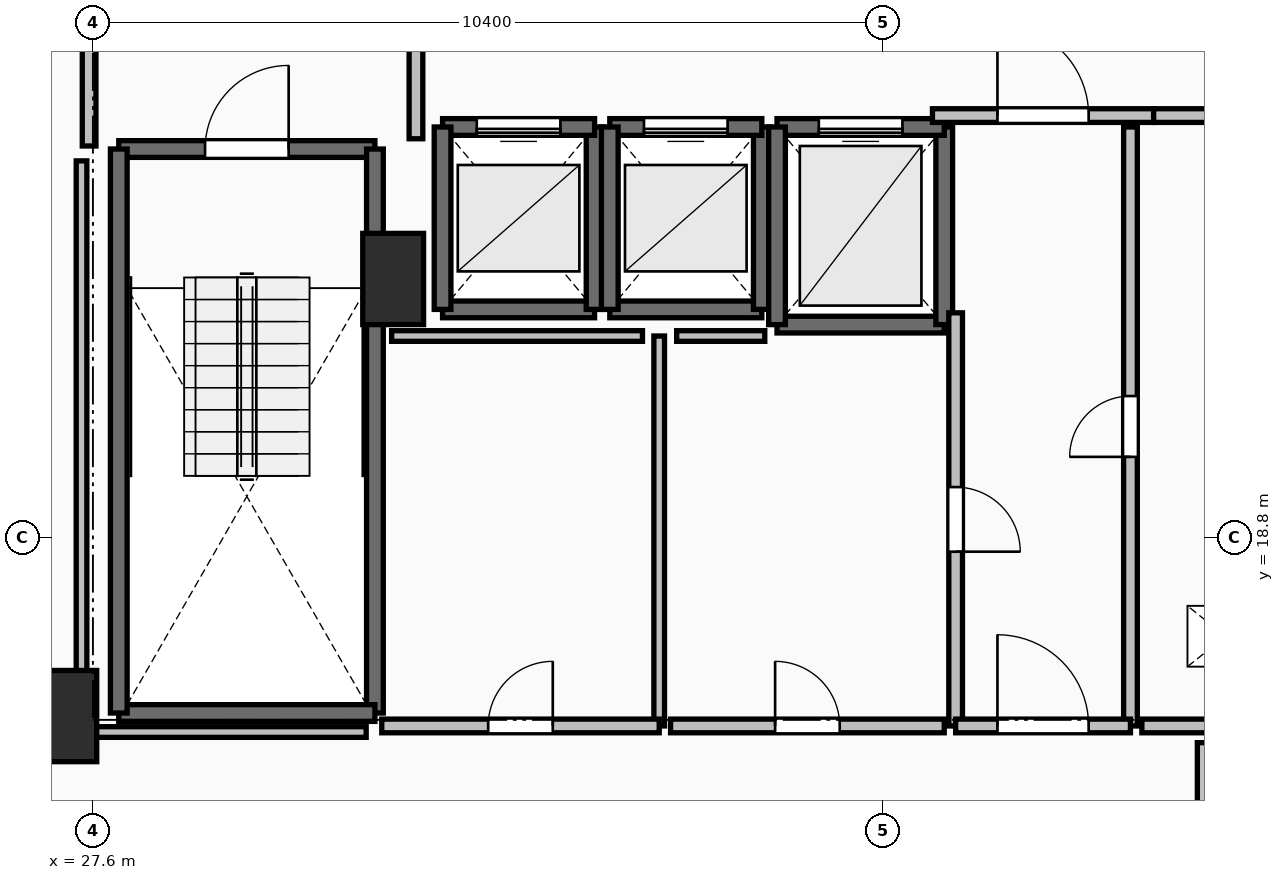
"""IFC4 building model, lengths in metres.
Left out: names, types, materials, properties, quantities, classifications, styles, units other than length and angle.
Written with IfcOpenShell. Run it as: python <this file> out.ifc"""

import sys

from ifc_helpers import new_model, si_unit, direction, frame, frame_2d, origin, origin_2d, place, context, subcontext, project, spatial, rectangle, extrude, element, fill, save


model = new_model("IFC4")
c1 = context("Model", 3, precision=1e-05, world=origin(), true_north=direction((0.0, 1.0)))
c2 = subcontext(c1, "Body", "Model", "MODEL_VIEW")
j1 = project(units=[si_unit("LENGTHUNIT", "METRE"), si_unit("PLANEANGLEUNIT", "RADIAN")], contexts=[c1])
p1 = place(None, origin())
s1 = spatial("IfcSite", under=j1, at=p1, CompositionType="ELEMENT")
p2 = place(p1, origin())
s2 = spatial("IfcBuilding", under=s1, at=p2, CompositionType="ELEMENT")
p3 = place(p2, frame((0.0, 0.0, 171.1)))
s3 = spatial("IfcBuildingStorey", under=s2, at=p3, CompositionType="ELEMENT", Elevation=171.1)
for number, where, z_axis, x_axis in (
    (1, (27.25, 16.45, 0.0), (0.0, 0.0, 1.0), (1.0, 0.0, 0.0)),
    (2, (31.55, 22.2, 0.0), (0.0, 0.0, 1.0), (1.0, 0.0, 0.0)),
):
    element("IfcColumn", number, at=place(p3, frame(where, z_axis=z_axis, x_axis=x_axis)), inside=s3, PredefinedType="PILASTER", context=c2, shape_type="SweptSolid", body=[
        extrude(rectangle(XDim=0.8, YDim=1.2, at=origin_2d()), origin(), (0.0, 0.0, 1.0), 3.5),
    ])
p4 = place(p3, frame((27.94, 23.91, 0.0), z_axis=(0.0, 0.0, 1.0), x_axis=(1.0, 0.0, 0.0)))
e3 = element("IfcWall", 3, at=p4, inside=s3, PredefinedType="SOLIDWALL", context=c2, shape_type="SweptSolid", body=[
    extrude(rectangle(XDim=3.37, YDim=0.22, at=frame_2d((1.685, 0.0))), origin(), (0.0, 0.0, 1.0), 3.2),
])
p5 = place(p4, frame((1.135, 0.0, 0.0)))
e4 = element("IfcOpeningElement", 4, at=p5, cuts=e3, PredefinedType="OPENING", context=c2, shape_type="SweptSolid", body=[
    extrude(rectangle(XDim=1.1, YDim=2.15, at=frame_2d((0.55, 1.075))), frame((0.0, 0.125, 0.0), z_axis=(0.0, -1.0, 0.0), x_axis=(1.0, 0.0, 0.0)), (0.0, 0.0, 1.0), 0.25),
])
p6 = place(p3, frame((31.31, 23.91, 0.0), z_axis=(0.0, 0.0, 1.0), x_axis=(0.0, -1.0, 0.0)))
e5 = element("IfcWall", 5, at=p6, inside=s3, PredefinedType="SOLIDWALL", context=c2, shape_type="SweptSolid", body=[
    extrude(rectangle(XDim=7.42, YDim=0.22, at=frame_2d((3.71, 0.0))), origin(), (0.0, 0.0, 1.0), 3.2),
])
p7 = place(p3, frame((31.31, 16.49, 0.0), z_axis=(0.0, 0.0, 1.0), x_axis=(-1.0, 0.0, 0.0)))
e6 = element("IfcWall", 6, at=p7, inside=s3, PredefinedType="SOLIDWALL", context=c2, shape_type="SweptSolid", body=[
    extrude(rectangle(XDim=3.37, YDim=0.22, at=frame_2d((1.685, 0.0))), origin(), (0.0, 0.0, 1.0), 3.2),
])
p8 = place(p3, frame((27.94, 16.49, 0.0), z_axis=(0.0, 0.0, 1.0), x_axis=(0.0, 1.0, 0.0)))
e7 = element("IfcWall", 7, at=p8, inside=s3, PredefinedType="SOLIDWALL", context=c2, shape_type="SweptSolid", body=[
    extrude(rectangle(XDim=7.42, YDim=0.22, at=frame_2d((3.71, 0.0))), origin(), (0.0, 0.0, 1.0), 3.2),
])
p9 = place(p3, frame((32.2, 21.8, 0.0), z_axis=(0.0, 0.0, 1.0), x_axis=(1.0, 0.0, 0.0)))
e8 = element("IfcWall", 8, at=p9, inside=s3, PredefinedType="SOLIDWALL", context=c2, shape_type="SweptSolid", body=[
    extrude(rectangle(XDim=2.0, YDim=0.22, at=frame_2d((1.0, 0.0))), origin(), (0.0, 0.0, 1.0), 3.2),
])
p10 = place(p3, frame((34.2, 21.8, 0.0), z_axis=(0.0, 0.0, 1.0), x_axis=(0.0, 1.0, 0.0)))
e9 = element("IfcWall", 9, at=p10, inside=s3, PredefinedType="SOLIDWALL", context=c2, shape_type="SweptSolid", body=[
    extrude(rectangle(XDim=2.4, YDim=0.22, at=frame_2d((1.2, 0.0))), origin(), (0.0, 0.0, 1.0), 3.2),
])
p11 = place(p3, frame((34.2, 24.2, 0.0), z_axis=(0.0, 0.0, 1.0), x_axis=(-1.0, 0.0, 0.0)))
e10 = element("IfcWall", 10, at=p11, inside=s3, PredefinedType="SOLIDWALL", context=c2, shape_type="SweptSolid", body=[
    extrude(rectangle(XDim=2.0, YDim=0.22, at=frame_2d((1.0, 0.0))), origin(), (0.0, 0.0, 1.0), 3.2),
])
p12 = place(p11, frame((0.45, 0.0, 0.0)))
e11 = element("IfcOpeningElement", 11, at=p12, cuts=e10, PredefinedType="OPENING", context=c2, shape_type="SweptSolid", body=[
    extrude(rectangle(XDim=1.1, YDim=2.2, at=frame_2d((0.55, 1.1))), frame((0.0, 0.125, 0.0), z_axis=(0.0, -1.0, 0.0), x_axis=(1.0, 0.0, 0.0)), (0.0, 0.0, 1.0), 0.25),
])
p13 = place(p3, frame((32.2, 24.2, 0.0), z_axis=(0.0, 0.0, 1.0), x_axis=(0.0, -1.0, 0.0)))
e12 = element("IfcWall", 12, at=p13, inside=s3, PredefinedType="SOLIDWALL", context=c2, shape_type="SweptSolid", body=[
    extrude(rectangle(XDim=2.4, YDim=0.22, at=frame_2d((1.2, 0.0))), origin(), (0.0, 0.0, 1.0), 3.2),
])
p14 = place(p3, frame((34.4, 21.8, 0.0), z_axis=(0.0, 0.0, 1.0), x_axis=(1.0, 0.0, 0.0)))
e13 = element("IfcWall", 13, at=p14, inside=s3, PredefinedType="SOLIDWALL", context=c2, shape_type="SweptSolid", body=[
    extrude(rectangle(XDim=2.0, YDim=0.22, at=frame_2d((1.0, 0.0))), origin(), (0.0, 0.0, 1.0), 3.2),
])
p15 = place(p3, frame((36.4, 21.8, 0.0), z_axis=(0.0, 0.0, 1.0), x_axis=(0.0, 1.0, 0.0)))
e14 = element("IfcWall", 14, at=p15, inside=s3, PredefinedType="SOLIDWALL", context=c2, shape_type="SweptSolid", body=[
    extrude(rectangle(XDim=2.4, YDim=0.22, at=frame_2d((1.2, 0.0))), origin(), (0.0, 0.0, 1.0), 3.2),
])
p16 = place(p3, frame((36.4, 24.2, 0.0), z_axis=(0.0, 0.0, 1.0), x_axis=(-1.0, 0.0, 0.0)))
e15 = element("IfcWall", 15, at=p16, inside=s3, PredefinedType="SOLIDWALL", context=c2, shape_type="SweptSolid", body=[
    extrude(rectangle(XDim=2.0, YDim=0.22, at=frame_2d((1.0, 0.0))), origin(), (0.0, 0.0, 1.0), 3.2),
])
p17 = place(p16, frame((0.45, 0.0, 0.0)))
e16 = element("IfcOpeningElement", 16, at=p17, cuts=e15, PredefinedType="OPENING", context=c2, shape_type="SweptSolid", body=[
    extrude(rectangle(XDim=1.1, YDim=2.2, at=frame_2d((0.55, 1.1))), frame((0.0, 0.125, 0.0), z_axis=(0.0, -1.0, 0.0), x_axis=(1.0, 0.0, 0.0)), (0.0, 0.0, 1.0), 0.25),
])
p18 = place(p3, frame((34.4, 24.2, 0.0), z_axis=(0.0, 0.0, 1.0), x_axis=(0.0, -1.0, 0.0)))
e17 = element("IfcWall", 17, at=p18, inside=s3, PredefinedType="SOLIDWALL", context=c2, shape_type="SweptSolid", body=[
    extrude(rectangle(XDim=2.4, YDim=0.22, at=frame_2d((1.2, 0.0))), origin(), (0.0, 0.0, 1.0), 3.2),
])
p19 = place(p3, frame((36.6, 21.6, 0.0), z_axis=(0.0, 0.0, 1.0), x_axis=(1.0, 0.0, 0.0)))
e18 = element("IfcWall", 18, at=p19, inside=s3, PredefinedType="SOLIDWALL", context=c2, shape_type="SweptSolid", body=[
    extrude(rectangle(XDim=2.2, YDim=0.22, at=frame_2d((1.1, 0.0))), origin(), (0.0, 0.0, 1.0), 3.2),
])
p20 = place(p3, frame((38.8, 21.6, 0.0), z_axis=(0.0, 0.0, 1.0), x_axis=(0.0, 1.0, 0.0)))
e19 = element("IfcWall", 19, at=p20, inside=s3, PredefinedType="SOLIDWALL", context=c2, shape_type="SweptSolid", body=[
    extrude(rectangle(XDim=2.6, YDim=0.22, at=frame_2d((1.3, 0.0))), origin(), (0.0, 0.0, 1.0), 3.2),
])
p21 = place(p3, frame((38.8, 24.2, 0.0), z_axis=(0.0, 0.0, 1.0), x_axis=(-1.0, 0.0, 0.0)))
e20 = element("IfcWall", 20, at=p21, inside=s3, PredefinedType="SOLIDWALL", context=c2, shape_type="SweptSolid", body=[
    extrude(rectangle(XDim=2.2, YDim=0.22, at=frame_2d((1.1, 0.0))), origin(), (0.0, 0.0, 1.0), 3.2),
])
p22 = place(p21, frame((0.55, 0.0, 0.0)))
e21 = element("IfcOpeningElement", 21, at=p22, cuts=e20, PredefinedType="OPENING", context=c2, shape_type="SweptSolid", body=[
    extrude(rectangle(XDim=1.1, YDim=2.2, at=frame_2d((0.55, 1.1))), frame((0.0, 0.125, 0.0), z_axis=(0.0, -1.0, 0.0), x_axis=(1.0, 0.0, 0.0)), (0.0, 0.0, 1.0), 0.25),
])
p23 = place(p3, frame((36.6, 24.2, 0.0), z_axis=(0.0, 0.0, 1.0), x_axis=(0.0, -1.0, 0.0)))
e22 = element("IfcWall", 22, at=p23, inside=s3, PredefinedType="SOLIDWALL", context=c2, shape_type="SweptSolid", body=[
    extrude(rectangle(XDim=2.6, YDim=0.22, at=frame_2d((1.3, 0.0))), origin(), (0.0, 0.0, 1.0), 3.2),
])
p24 = place(p3, frame((31.85, 24.045, 0.0), z_axis=(0.0, 0.0, 1.0), x_axis=(0.0, 1.0, 0.0)))
e23 = element("IfcWall", 23, at=p24, inside=s3, PredefinedType="PARTITIONING", context=c2, shape_type="SweptSolid", body=[
    extrude(rectangle(XDim=3.91, YDim=0.18, at=frame_2d((1.955, 0.0))), origin(), (0.0, 0.0, 1.0), 3.2),
])
p25 = place(p24, frame((1.355, 0.0, 0.0)))
e24 = element("IfcOpeningElement", 24, at=p25, cuts=e23, PredefinedType="OPENING", context=c2, shape_type="SweptSolid", body=[
    extrude(rectangle(XDim=1.2, YDim=2.15, at=frame_2d((0.6, 1.075))), frame((0.0, 0.105, 0.0), z_axis=(0.0, -1.0, 0.0), x_axis=(1.0, 0.0, 0.0)), (0.0, 0.0, 1.0), 0.21),
])
p26 = place(p3, frame((27.55, 28.0, 0.0), z_axis=(0.0, 0.0, 1.0), x_axis=(0.0, -1.0, 0.0)))
e25 = element("IfcWall", 25, at=p26, inside=s3, PredefinedType="PARTITIONING", context=c2, shape_type="SweptSolid", body=[
    extrude(rectangle(XDim=4.05, YDim=0.18, at=frame_2d((2.025, 0.0))), origin(), (0.0, 0.0, 1.0), 3.2),
])
p27 = place(p26, frame((1.425, 0.0, 0.0)))
e26 = element("IfcOpeningElement", 26, at=p27, cuts=e25, PredefinedType="OPENING", context=c2, shape_type="SweptSolid", body=[
    extrude(rectangle(XDim=1.2, YDim=2.15, at=frame_2d((0.6, 1.075))), frame((0.0, 0.105, 0.0), z_axis=(0.0, -1.0, 0.0), x_axis=(1.0, 0.0, 0.0)), (0.0, 0.0, 1.0), 0.21),
])
p28 = place(p3, frame((38.645, 24.35, 0.0), z_axis=(0.0, 0.0, 1.0), x_axis=(1.0, 0.0, 0.0)))
e27 = element("IfcWall", 27, at=p28, inside=s3, PredefinedType="PARTITIONING", context=c2, shape_type="SweptSolid", body=[
    extrude(rectangle(XDim=2.91, YDim=0.18, at=frame_2d((1.455, 0.0))), origin(), (0.0, 0.0, 1.0), 3.2),
])
p29 = place(p28, frame((0.855, 0.0, 0.0)))
e28 = element("IfcOpeningElement", 28, at=p29, cuts=e27, PredefinedType="OPENING", context=c2, shape_type="SweptSolid", body=[
    extrude(rectangle(XDim=1.2, YDim=2.15, at=frame_2d((0.6, 1.075))), frame((0.0, 0.105, 0.0), z_axis=(0.0, -1.0, 0.0), x_axis=(1.0, 0.0, 0.0)), (0.0, 0.0, 1.0), 0.21),
])
p30 = place(p3, frame((41.555, 24.35, 0.0), z_axis=(0.0, 0.0, 1.0), x_axis=(1.0, 0.0, 0.0)))
e29 = element("IfcWall", 29, at=p30, inside=s3, PredefinedType="PARTITIONING", context=c2, shape_type="SweptSolid", body=[
    extrude(rectangle(XDim=2.445, YDim=0.18, at=frame_2d((1.223, 0.0))), origin(), (0.0, 0.0, 1.0), 3.2),
])
p31 = place(p30, frame((0.823, 0.0, 0.0)))
e30 = element("IfcOpeningElement", 30, at=p31, cuts=e29, PredefinedType="OPENING", context=c2, shape_type="SweptSolid", body=[
    extrude(rectangle(XDim=0.8, YDim=2.05, at=frame_2d((0.4, 1.025))), frame((0.0, 0.105, 0.0), z_axis=(0.0, -1.0, 0.0), x_axis=(1.0, 0.0, 0.0)), (0.0, 0.0, 1.0), 0.21),
])
p32 = place(p3, frame((41.25, 16.32, 0.0), z_axis=(0.0, 0.0, 1.0), x_axis=(0.0, 1.0, 0.0)))
e31 = element("IfcWall", 31, at=p32, inside=s3, PredefinedType="PARTITIONING", context=c2, shape_type="SweptSolid", body=[
    extrude(rectangle(XDim=7.88, YDim=0.18, at=frame_2d((3.94, 0.0))), origin(), (0.0, 0.0, 1.0), 3.2),
])
p33 = place(p32, frame((3.54, 0.0, 0.0)))
e32 = element("IfcOpeningElement", 32, at=p33, cuts=e31, PredefinedType="OPENING", context=c2, shape_type="SweptSolid", body=[
    extrude(rectangle(XDim=0.8, YDim=2.05, at=frame_2d((0.4, 1.025))), frame((0.0, 0.105, 0.0), z_axis=(0.0, -1.0, 0.0), x_axis=(1.0, 0.0, 0.0)), (0.0, 0.0, 1.0), 0.21),
])
p34 = place(p3, frame((38.95, 21.755, 0.0), z_axis=(0.0, 0.0, 1.0), x_axis=(0.0, -1.0, 0.0)))
e33 = element("IfcWall", 33, at=p34, inside=s3, PredefinedType="PARTITIONING", context=c2, shape_type="SweptSolid", body=[
    extrude(rectangle(XDim=5.435, YDim=0.18, at=frame_2d((2.717, 0.0))), origin(), (0.0, 0.0, 1.0), 3.2),
])
p35 = place(p34, frame((2.292, 0.0, 0.0)))
e34 = element("IfcOpeningElement", 34, at=p35, cuts=e33, PredefinedType="OPENING", context=c2, shape_type="SweptSolid", body=[
    extrude(rectangle(XDim=0.85, YDim=2.1, at=frame_2d((0.425, 1.05))), frame((0.0, 0.105, 0.0), z_axis=(0.0, -1.0, 0.0), x_axis=(1.0, 0.0, 0.0)), (0.0, 0.0, 1.0), 0.21),
])
p36 = place(p3, frame((38.95, 16.32, 0.0), z_axis=(0.0, 0.0, 1.0), x_axis=(1.0, 0.0, 0.0)))
e35 = element("IfcWall", 35, at=p36, inside=s3, PredefinedType="PARTITIONING", context=c2, shape_type="SweptSolid", body=[
    extrude(rectangle(XDim=2.3, YDim=0.18, at=frame_2d((1.15, 0.0))), origin(), (0.0, 0.0, 1.0), 3.2),
])
p37 = place(p36, frame((0.55, 0.0, 0.0)))
e36 = element("IfcOpeningElement", 36, at=p37, cuts=e35, PredefinedType="OPENING", context=c2, shape_type="SweptSolid", body=[
    extrude(rectangle(XDim=1.2, YDim=2.15, at=frame_2d((0.6, 1.075))), frame((0.0, 0.105, 0.0), z_axis=(0.0, -1.0, 0.0), x_axis=(1.0, 0.0, 0.0)), (0.0, 0.0, 1.0), 0.21),
])
p38 = place(p3, frame((41.4, 16.32, 0.0), z_axis=(0.0, 0.0, 1.0), x_axis=(1.0, 0.0, 0.0)))
e37 = element("IfcWall", 37, at=p38, inside=s3, PredefinedType="PARTITIONING", context=c2, shape_type="SweptSolid", body=[
    extrude(rectangle(XDim=3.2, YDim=0.18, at=frame_2d((1.6, 0.0))), origin(), (0.0, 0.0, 1.0), 3.2),
])
p39 = place(p38, frame((1.2, 0.0, 0.0)))
e38 = element("IfcOpeningElement", 38, at=p39, cuts=e37, PredefinedType="OPENING", context=c2, shape_type="SweptSolid", body=[
    extrude(rectangle(XDim=0.8, YDim=2.05, at=frame_2d((0.4, 1.025))), frame((0.0, 0.105, 0.0), z_axis=(0.0, -1.0, 0.0), x_axis=(1.0, 0.0, 0.0)), (0.0, 0.0, 1.0), 0.21),
])
p40 = place(p3, frame((35.05, 16.32, 0.0), z_axis=(0.0, 0.0, 1.0), x_axis=(0.0, 1.0, 0.0)))
e39 = element("IfcWall", 39, at=p40, inside=s3, PredefinedType="PARTITIONING", context=c2, shape_type="SweptSolid", body=[
    extrude(rectangle(XDim=5.13, YDim=0.14, at=frame_2d((2.565, 0.0))), origin(), (0.0, 0.0, 1.0), 3.2),
])
p41 = place(p3, frame((31.4, 16.32, 0.0), z_axis=(0.0, 0.0, 1.0), x_axis=(1.0, 0.0, 0.0)))
e40 = element("IfcWall", 40, at=p41, inside=s3, PredefinedType="PARTITIONING", context=c2, shape_type="SweptSolid", body=[
    extrude(rectangle(XDim=3.65, YDim=0.18, at=frame_2d((1.825, 0.0))), origin(), (0.0, 0.0, 1.0), 3.2),
])
p42 = place(p41, frame((1.4, 0.0, 0.0)))
e41 = element("IfcOpeningElement", 41, at=p42, cuts=e40, PredefinedType="OPENING", context=c2, shape_type="SweptSolid", body=[
    extrude(rectangle(XDim=0.85, YDim=2.1, at=frame_2d((0.425, 1.05))), frame((0.0, 0.105, 0.0), z_axis=(0.0, -1.0, 0.0), x_axis=(1.0, 0.0, 0.0)), (0.0, 0.0, 1.0), 0.21),
])
p43 = place(p3, frame((35.2, 16.32, 0.0), z_axis=(0.0, 0.0, 1.0), x_axis=(1.0, 0.0, 0.0)))
e42 = element("IfcWall", 42, at=p43, inside=s3, PredefinedType="PARTITIONING", context=c2, shape_type="SweptSolid", body=[
    extrude(rectangle(XDim=3.6, YDim=0.18, at=frame_2d((1.8, 0.0))), origin(), (0.0, 0.0, 1.0), 3.2),
])
p44 = place(p43, frame((1.375, 0.0, 0.0)))
e43 = element("IfcOpeningElement", 43, at=p44, cuts=e42, PredefinedType="OPENING", context=c2, shape_type="SweptSolid", body=[
    extrude(rectangle(XDim=0.85, YDim=2.1, at=frame_2d((0.425, 1.05))), frame((0.0, 0.105, 0.0), z_axis=(0.0, -1.0, 0.0), x_axis=(1.0, 0.0, 0.0)), (0.0, 0.0, 1.0), 0.21),
])
p45 = place(p3, frame((34.83, 21.45, 0.0), z_axis=(0.0, 0.0, 1.0), x_axis=(-1.0, 0.0, 0.0)))
e44 = element("IfcWall", 44, at=p45, inside=s3, PredefinedType="PARTITIONING", context=c2, shape_type="SweptSolid", body=[
    extrude(rectangle(XDim=3.3, YDim=0.14, at=frame_2d((1.65, 0.0))), origin(), (0.0, 0.0, 1.0), 3.2),
])
p46 = place(p3, frame((36.439, 21.45, 0.0), z_axis=(0.0, 0.0, 1.0), x_axis=(-1.0, 0.0, 0.0)))
e45 = element("IfcWall", 45, at=p46, inside=s3, PredefinedType="PARTITIONING", context=c2, shape_type="SweptSolid", body=[
    extrude(rectangle(XDim=1.159, YDim=0.14, at=frame_2d((0.58, 0.0))), origin(), (0.0, 0.0, 1.0), 3.2),
])
p47 = place(p3, frame((27.45, 23.754, 0.0), z_axis=(0.0, 0.0, 1.0), x_axis=(0.0, -1.0, 0.0)))
e46 = element("IfcWall", 46, at=p47, inside=s3, PredefinedType="PARTITIONING", context=c2, shape_type="SweptSolid", body=[
    extrude(rectangle(XDim=7.514, YDim=0.14, at=frame_2d((3.757, 0.0))), origin(), (0.0, 0.0, 1.0), 2.392),
])
p48 = place(p3, frame((27.45, 16.24, 0.0), z_axis=(0.0, 0.0, 1.0), x_axis=(1.0, 0.0, 0.0)))
e47 = element("IfcWall", 47, at=p48, inside=s3, PredefinedType="PARTITIONING", context=c2, shape_type="SweptSolid", body=[
    extrude(rectangle(XDim=3.745, YDim=0.14, at=frame_2d((1.873, 0.0))), origin(), (0.0, 0.0, 1.0), 2.392),
])
p49 = place(p3, frame((42.2, 16.1, 0.0), z_axis=(0.0, 0.0, 1.0), x_axis=(0.0, -1.0, 0.0)))
e48 = element("IfcWall", 48, at=p49, inside=s3, PredefinedType="PARTITIONING", context=c2, shape_type="SweptSolid", body=[
    extrude(rectangle(XDim=1.83, YDim=0.14, at=frame_2d((0.915, 0.0))), origin(), (0.0, 0.0, 1.0), 3.2),
])
p50 = place(p5, origin())
e49 = element("IfcDoor", 49, at=p50, inside=s3, OperationType="SINGLE_SWING_RIGHT", PredefinedType="DOOR", context=c2, shape_type="SweptSolid", body=[
    extrude(rectangle(XDim=1.1, YDim=2.15, at=frame_2d((0.55, 1.075))), frame((0.0, 0.025, 0.0), z_axis=(0.0, -1.0, 0.0), x_axis=(1.0, 0.0, 0.0)), (0.0, 0.0, 1.0), 0.05),
])
fill(e4, e49)
p51 = place(p12, origin())
e50 = element("IfcDoor", 50, at=p51, inside=s3, OperationType="SLIDING_TO_LEFT", PredefinedType="DOOR", context=c2, shape_type="SweptSolid", body=[
    extrude(rectangle(XDim=1.1, YDim=2.2, at=frame_2d((0.55, 1.1))), frame((0.0, 0.025, 0.0), z_axis=(0.0, -1.0, 0.0), x_axis=(1.0, 0.0, 0.0)), (0.0, 0.0, 1.0), 0.05),
])
fill(e11, e50)
p52 = place(p17, origin())
e51 = element("IfcDoor", 51, at=p52, inside=s3, OperationType="SLIDING_TO_LEFT", PredefinedType="DOOR", context=c2, shape_type="SweptSolid", body=[
    extrude(rectangle(XDim=1.1, YDim=2.2, at=frame_2d((0.55, 1.1))), frame((0.0, 0.025, 0.0), z_axis=(0.0, -1.0, 0.0), x_axis=(1.0, 0.0, 0.0)), (0.0, 0.0, 1.0), 0.05),
])
fill(e16, e51)
p53 = place(p22, origin())
e52 = element("IfcDoor", 52, at=p53, inside=s3, OperationType="SLIDING_TO_LEFT", PredefinedType="DOOR", context=c2, shape_type="SweptSolid", body=[
    extrude(rectangle(XDim=1.1, YDim=2.2, at=frame_2d((0.55, 1.1))), frame((0.0, 0.025, 0.0), z_axis=(0.0, -1.0, 0.0), x_axis=(1.0, 0.0, 0.0)), (0.0, 0.0, 1.0), 0.05),
])
fill(e21, e52)
p54 = place(p29, origin())
e53 = element("IfcDoor", 53, at=p54, inside=s3, OperationType="SINGLE_SWING_LEFT", PredefinedType="DOOR", context=c2, shape_type="SweptSolid", body=[
    extrude(rectangle(XDim=1.2, YDim=2.15, at=frame_2d((0.6, 1.075))), frame((0.0, 0.025, 0.0), z_axis=(0.0, -1.0, 0.0), x_axis=(1.0, 0.0, 0.0)), (0.0, 0.0, 1.0), 0.05),
])
fill(e28, e53)
p55 = place(p33, origin())
e54 = element("IfcDoor", 54, at=p55, inside=s3, OperationType="SINGLE_SWING_LEFT", PredefinedType="DOOR", context=c2, shape_type="SweptSolid", body=[
    extrude(rectangle(XDim=0.8, YDim=2.05, at=frame_2d((0.4, 1.025))), frame((0.0, 0.025, 0.0), z_axis=(0.0, -1.0, 0.0), x_axis=(1.0, 0.0, 0.0)), (0.0, 0.0, 1.0), 0.05),
])
fill(e32, e54)
p56 = place(p35, origin())
e55 = element("IfcDoor", 55, at=p56, inside=s3, OperationType="SINGLE_SWING_RIGHT", PredefinedType="DOOR", context=c2, shape_type="SweptSolid", body=[
    extrude(rectangle(XDim=0.85, YDim=2.1, at=frame_2d((0.425, 1.05))), frame((0.0, 0.025, 0.0), z_axis=(0.0, -1.0, 0.0), x_axis=(1.0, 0.0, 0.0)), (0.0, 0.0, 1.0), 0.05),
])
fill(e34, e55)
p57 = place(p37, origin())
e56 = element("IfcDoor", 56, at=p57, inside=s3, OperationType="SINGLE_SWING_LEFT", PredefinedType="DOOR", context=c2, shape_type="SweptSolid", body=[
    extrude(rectangle(XDim=1.2, YDim=2.15, at=frame_2d((0.6, 1.075))), frame((0.0, 0.025, 0.0), z_axis=(0.0, -1.0, 0.0), x_axis=(1.0, 0.0, 0.0)), (0.0, 0.0, 1.0), 0.05),
])
fill(e36, e56)
p58 = place(p42, origin())
e57 = element("IfcDoor", 57, at=p58, inside=s3, OperationType="SINGLE_SWING_RIGHT", PredefinedType="DOOR", context=c2, shape_type="SweptSolid", body=[
    extrude(rectangle(XDim=0.85, YDim=2.1, at=frame_2d((0.425, 1.05))), frame((0.0, 0.025, 0.0), z_axis=(0.0, -1.0, 0.0), x_axis=(1.0, 0.0, 0.0)), (0.0, 0.0, 1.0), 0.05),
])
fill(e41, e57)
p59 = place(p44, origin())
e58 = element("IfcDoor", 58, at=p59, inside=s3, OperationType="SINGLE_SWING_LEFT", PredefinedType="DOOR", context=c2, shape_type="SweptSolid", body=[
    extrude(rectangle(XDim=0.85, YDim=2.1, at=frame_2d((0.425, 1.05))), frame((0.0, 0.025, 0.0), z_axis=(0.0, -1.0, 0.0), x_axis=(1.0, 0.0, 0.0)), (0.0, 0.0, 1.0), 0.05),
])
fill(e43, e58)
save(model, sys.argv[1])
